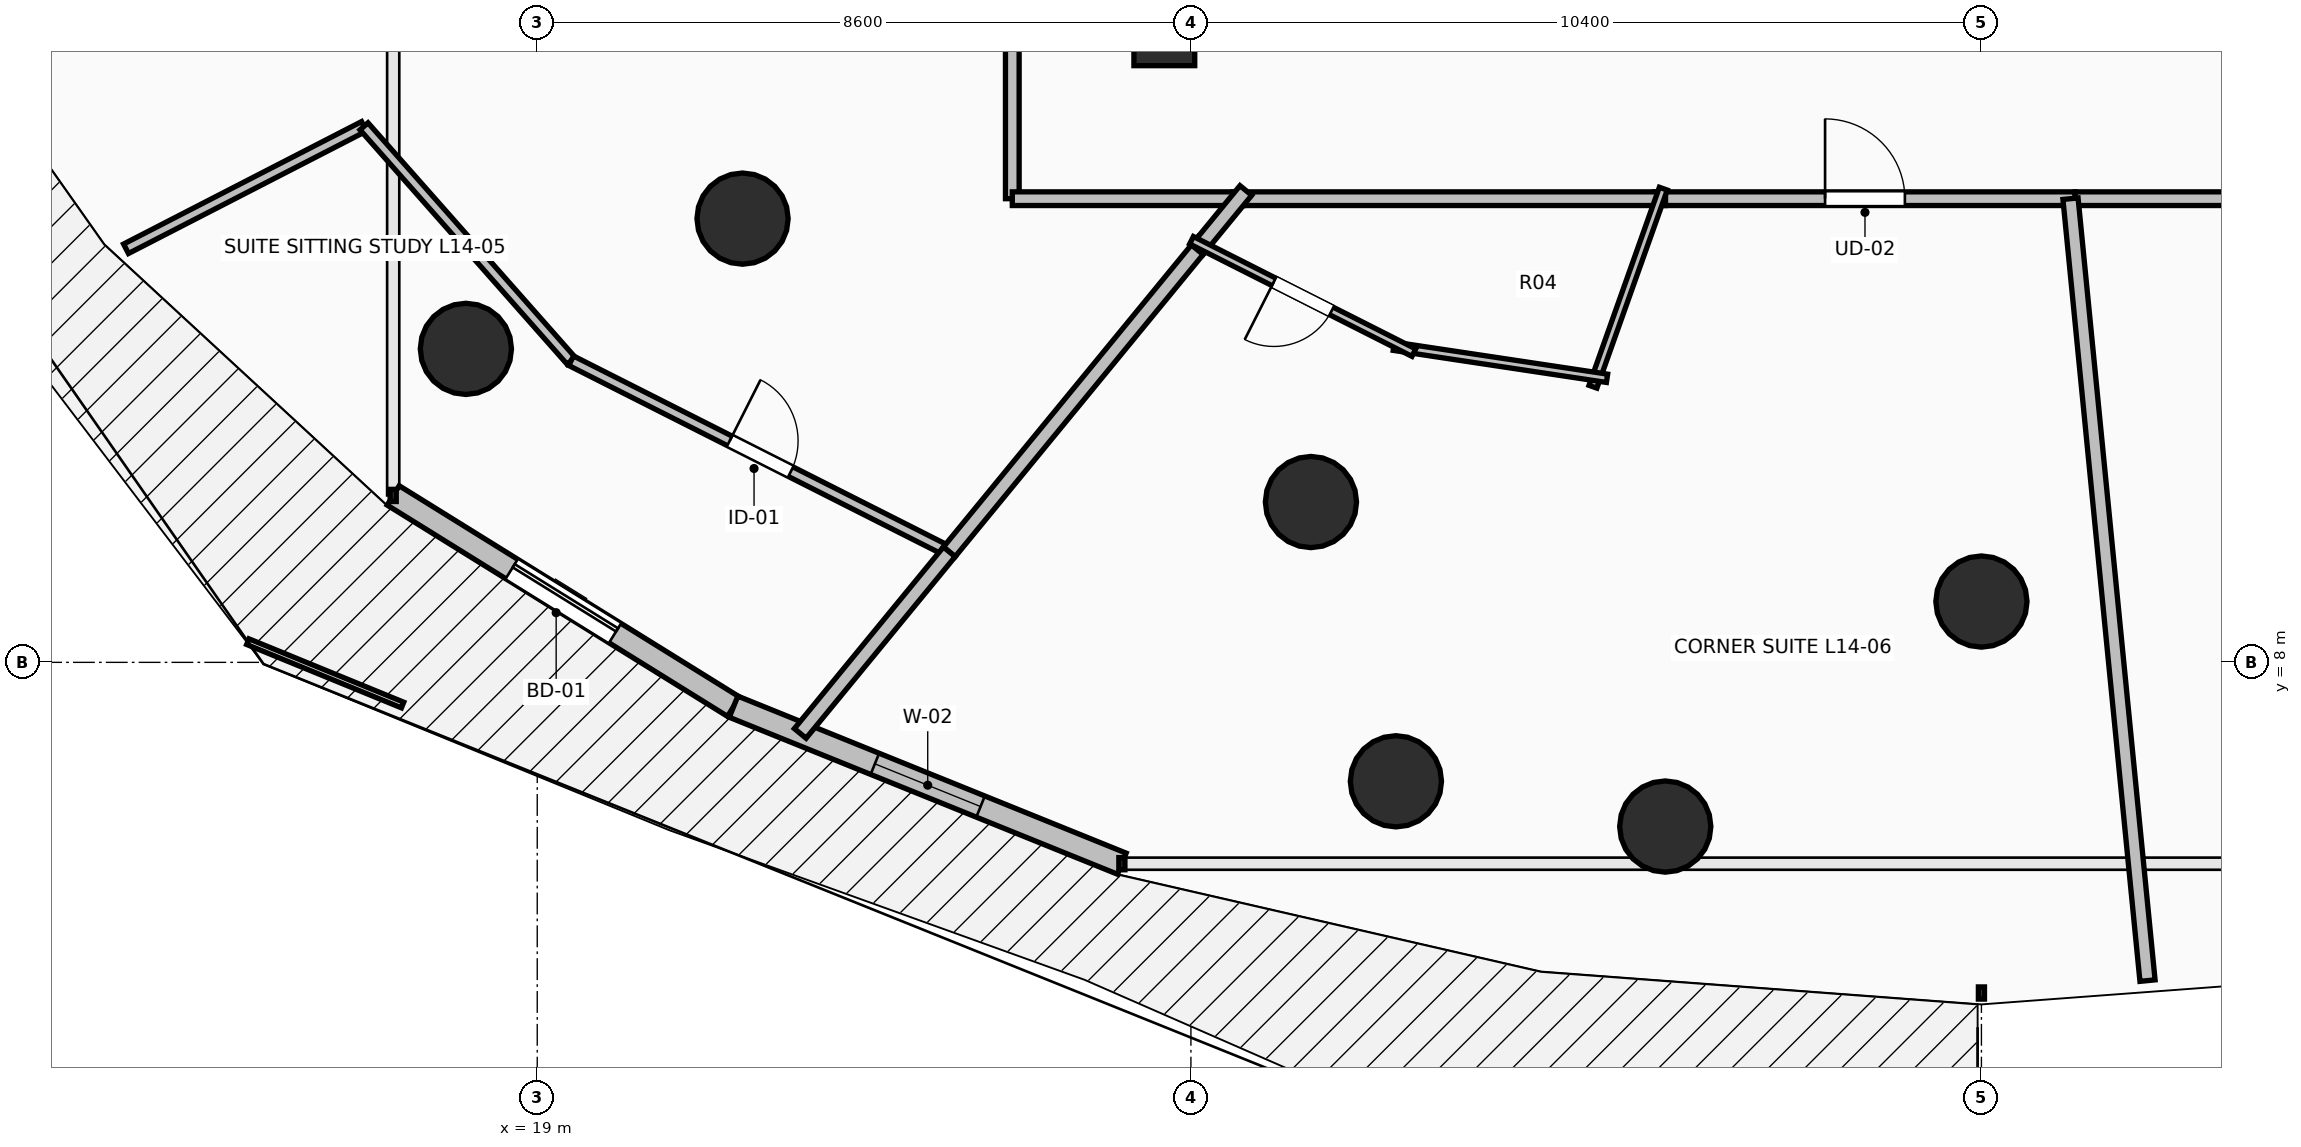
"""IFC4 building model, lengths in metres.
Left out: names, types, materials, properties, quantities, classifications, styles, units other than length and angle.
Written with IfcOpenShell. Run it as: python <this file> out.ifc"""

import sys

from ifc_helpers import new_model, si_unit, direction, frame, frame_2d, origin, origin_2d, place, context, subcontext, project, spatial, rectangle, circle, extrude, element, fill, save


model = new_model("IFC4")
c1 = context("Model", 3, precision=1e-05, world=origin(), true_north=direction((0.0, 1.0)))
c2 = subcontext(c1, "Body", "Model", "MODEL_VIEW")
j1 = project(units=[si_unit("LENGTHUNIT", "METRE"), si_unit("PLANEANGLEUNIT", "RADIAN")], contexts=[c1])
p1 = place(None, origin())
s1 = spatial("IfcSite", under=j1, at=p1, CompositionType="ELEMENT")
p2 = place(p1, origin())
s2 = spatial("IfcBuilding", under=s1, at=p2, CompositionType="ELEMENT")
p3 = place(p2, frame((0.0, 0.0, 55.5)))
s3 = spatial("IfcBuildingStorey", under=s2, at=p3, CompositionType="ELEMENT", Elevation=55.5)
for number, where, z_axis, x_axis in (
    (1, (21.701, 13.838, 0.0), (0.0, 0.0, 1.0), (-0.707, -0.707, 0.0)),
    (2, (29.179, 10.109, 0.0), (0.0, 0.0, 1.0), (-0.383, -0.924, 0.0)),
    (3, (38.0, 8.8, 0.0), (0.0, 0.0, 1.0), (0.0, -1.0, 0.0)),
    (4, (18.061, 12.124, 0.0), (0.0, 0.0, 1.0), (-0.707, -0.707, 0.0)),
    (5, (30.297, 6.435, 0.0), (0.0, 0.0, 1.0), (-0.383, -0.924, 0.0)),
    (6, (33.84, 5.84, 0.0), (0.0, 0.0, 1.0), (0.0, -1.0, 0.0)),
):
    element("IfcColumn", number, at=place(p3, frame(where, z_axis=z_axis, x_axis=x_axis)), inside=s3, PredefinedType="COLUMN", context=c2, shape_type="SweptSolid", body=[
        extrude(circle(Radius=0.6, at=origin_2d()), origin(), (0.0, 0.0, 1.0), 3.5),
    ])
p4 = place(p3, frame((27.25, 16.45, 0.0), z_axis=(0.0, 0.0, 1.0), x_axis=(1.0, 0.0, 0.0)))
e7 = element("IfcColumn", 7, at=p4, inside=s3, PredefinedType="PILASTER", context=c2, shape_type="SweptSolid", body=[
    extrude(rectangle(XDim=0.8, YDim=1.2, at=origin_2d()), origin(), (0.0, 0.0, 1.0), 3.5),
])
p5 = place(p3, frame((17.105, 10.196, 0.0), z_axis=(0.0, 0.0, 1.0), x_axis=(0.849633724826, -0.527373239404, 0.0)))
e8 = element("IfcWall", 8, at=p5, inside=s3, PredefinedType="STANDARD", context=c2, shape_type="SweptSolid", body=[
    extrude(rectangle(XDim=5.271, YDim=0.3, at=frame_2d((2.635, 0.0))), origin(), (0.0, 0.0, 1.0), 3.24),
])
p6 = place(p5, frame((1.835, 0.0, 0.0)))
e9 = element("IfcOpeningElement", 9, at=p6, cuts=e8, PredefinedType="OPENING", context=c2, shape_type="SweptSolid", body=[
    extrude(rectangle(XDim=1.6, YDim=2.3, at=frame_2d((0.8, 1.15))), frame((0.0, 0.165, 0.0), z_axis=(0.0, -1.0, 0.0), x_axis=(1.0, 0.0, 0.0)), (0.0, 0.0, 1.0), 0.33),
])
p7 = place(p3, frame((21.583, 7.417, 0.0), z_axis=(0.0, 0.0, 1.0), x_axis=(0.927095325176, -0.374825636845, 0.0)))
e10 = element("IfcWall", 10, at=p7, inside=s3, PredefinedType="STANDARD", context=c2, shape_type="SweptSolid", body=[
    extrude(rectangle(XDim=5.51, YDim=0.3, at=frame_2d((2.755, 0.0))), origin(), (0.0, 0.0, 1.0), 3.24),
])
p8 = place(p7, frame((2.005, 0.0, 0.85)))
e11 = element("IfcOpeningElement", 11, at=p8, cuts=e10, PredefinedType="OPENING", context=c2, shape_type="SweptSolid", body=[
    extrude(rectangle(XDim=1.5, YDim=2.19, at=frame_2d((0.75, 1.095))), frame((0.0, 0.165, 0.0), z_axis=(0.0, -1.0, 0.0), x_axis=(1.0, 0.0, 0.0)), (0.0, 0.0, 1.0), 0.33),
])
p9 = place(p3, frame((25.25, 19.999, 0.0), z_axis=(0.0, 0.0, 1.0), x_axis=(0.0, -1.0, 0.0)))
e12 = element("IfcWall", 12, at=p9, inside=s3, PredefinedType="PARTITIONING", context=c2, shape_type="SweptSolid", body=[
    extrude(rectangle(XDim=5.899, YDim=0.18, at=frame_2d((2.949, 0.0))), origin(), (0.0, 0.0, 1.0), 2.432),
])
p10 = place(p9, frame((2.425, 0.0, 0.0)))
e13 = element("IfcOpeningElement", 13, at=p10, cuts=e12, PredefinedType="OPENING", context=c2, shape_type="SweptSolid", body=[
    extrude(rectangle(XDim=1.05, YDim=2.2, at=frame_2d((0.525, 1.1))), frame((0.0, 0.105, 0.0), z_axis=(0.0, -1.0, 0.0), x_axis=(1.0, 0.0, 0.0)), (0.0, 0.0, 1.0), 0.21),
])
p11 = place(p3, frame((25.25, 14.1, 0.0), z_axis=(0.0, 0.0, 1.0), x_axis=(1.0, 0.0, 0.0)))
e14 = element("IfcWall", 14, at=p11, inside=s3, PredefinedType="PARTITIONING", context=c2, shape_type="SweptSolid", body=[
    extrude(rectangle(XDim=3.044, YDim=0.18, at=frame_2d((1.522, 0.0))), origin(), (0.0, 0.0, 1.0), 2.432),
])
p12 = place(p3, frame((33.704, 14.1, 0.0), z_axis=(0.0, 0.0, 1.0), x_axis=(1.0, 0.0, 0.0)))
e15 = element("IfcWall", 15, at=p12, inside=s3, PredefinedType="PARTITIONING", context=c2, shape_type="SweptSolid", body=[
    extrude(rectangle(XDim=5.528, YDim=0.18, at=frame_2d((2.764, 0.0))), origin(), (0.0, 0.0, 1.0), 3.24),
])
p13 = place(p12, frame((2.239, 0.0, 0.0)))
e16 = element("IfcOpeningElement", 16, at=p13, cuts=e15, PredefinedType="OPENING", context=c2, shape_type="SweptSolid", body=[
    extrude(rectangle(XDim=1.05, YDim=2.2, at=frame_2d((0.525, 1.1))), frame((0.0, 0.105, 0.0), z_axis=(0.0, -1.0, 0.0), x_axis=(1.0, 0.0, 0.0)), (0.0, 0.0, 1.0), 0.21),
])
p14 = place(p3, frame((28.154, 14.1, 0.0), z_axis=(0.0, 0.0, 1.0), x_axis=(1.0, 0.0, 0.0)))
e17 = element("IfcWall", 17, at=p14, inside=s3, PredefinedType="PARTITIONING", context=c2, shape_type="SweptSolid", body=[
    extrude(rectangle(XDim=5.69, YDim=0.18, at=frame_2d((2.845, 0.0))), origin(), (0.0, 0.0, 1.0), 2.432),
])
p15 = place(p3, frame((39.232, 14.1, 0.0), z_axis=(0.0, 0.0, 1.0), x_axis=(1.0, 0.0, 0.0)))
e18 = element("IfcWall", 18, at=p15, inside=s3, PredefinedType="PARTITIONING", context=c2, shape_type="SweptSolid", body=[
    extrude(rectangle(XDim=2.968, YDim=0.18, at=frame_2d((1.484, 0.0))), origin(), (0.0, 0.0, 1.0), 3.24),
])
p16 = place(p3, frame((13.59, 13.441, 0.0), z_axis=(0.0, 0.0, 1.0), x_axis=(0.889180616302, 0.457556369852, 0.0)))
e19 = element("IfcWall", 19, at=p16, inside=s3, PredefinedType="PARTITIONING", context=c2, shape_type="SweptSolid", body=[
    extrude(rectangle(XDim=3.521, YDim=0.14, at=frame_2d((1.76, 0.0))), origin(), (0.0, 0.0, 1.0), 2.624),
])
p17 = place(p3, frame((16.721, 15.052, 0.0), z_axis=(0.0, 0.0, 1.0), x_axis=(0.662159063844, -0.749363312532, 0.0)))
e20 = element("IfcWall", 20, at=p17, inside=s3, PredefinedType="PARTITIONING", context=c2, shape_type="SweptSolid", body=[
    extrude(rectangle(XDim=4.115, YDim=0.14, at=frame_2d((2.058, 0.0))), origin(), (0.0, 0.0, 1.0), 2.432),
])
p18 = place(p3, frame((19.446, 11.968, 0.0), z_axis=(0.0, 0.0, 1.0), x_axis=(0.892518178955, -0.451011419184, 0.0)))
e21 = element("IfcWall", 21, at=p18, inside=s3, PredefinedType="PARTITIONING", context=c2, shape_type="SweptSolid", body=[
    extrude(rectangle(XDim=5.574, YDim=0.14, at=frame_2d((2.787, 0.0))), origin(), (0.0, 0.0, 1.0), 3.24),
])
p19 = place(p18, frame((2.337, 0.0, 0.0)))
e22 = element("IfcOpeningElement", 22, at=p19, cuts=e21, PredefinedType="OPENING", context=c2, shape_type="SweptSolid", body=[
    extrude(rectangle(XDim=0.9, YDim=2.1, at=frame_2d((0.45, 1.05))), frame((0.0, 0.085, 0.0), z_axis=(0.0, -1.0, 0.0), x_axis=(1.0, 0.0, 0.0)), (0.0, 0.0, 1.0), 0.17),
])
p20 = place(p3, frame((24.421, 9.454, 0.0), z_axis=(0.0, 0.0, 1.0), x_axis=(0.634420016008, 0.772988514332, 0.0)))
e23 = element("IfcWall", 23, at=p20, inside=s3, PredefinedType="PARTITIONING", context=c2, shape_type="SweptSolid", body=[
    extrude(rectangle(XDim=5.282, YDim=0.2, at=frame_2d((2.641, 0.0))), origin(), (0.0, 0.0, 1.0), 2.886),
])
p21 = place(p3, frame((27.683, 13.429, 0.0), z_axis=(0.0, 0.0, 1.0), x_axis=(0.634186727441, 0.77317992391, 0.0)))
e24 = element("IfcWall", 24, at=p21, inside=s3, PredefinedType="PARTITIONING", context=c2, shape_type="SweptSolid", body=[
    extrude(rectangle(XDim=1.008, YDim=0.2, at=frame_2d((0.504, 0.0))), origin(), (0.0, 0.0, 1.0), 2.432),
])
p22 = place(p3, frame((22.46, 7.065, 0.0), z_axis=(0.0, 0.0, 1.0), x_axis=(0.634432805544, 0.772978017313, 0.0)))
e25 = element("IfcWall", 25, at=p22, inside=s3, PredefinedType="PARTITIONING", context=c2, shape_type="SweptSolid", body=[
    extrude(rectangle(XDim=3.091, YDim=0.2, at=frame_2d((1.545, 0.0))), origin(), (0.0, 0.0, 1.0), 2.624),
])
p23 = place(p3, frame((33.815, 14.232, 0.0), z_axis=(0.0, 0.0, 1.0), x_axis=(-0.334786713612, -0.942293933117, 0.0)))
e26 = element("IfcWall", 26, at=p23, inside=s3, PredefinedType="PARTITIONING", context=c2, shape_type="SweptSolid", body=[
    extrude(rectangle(XDim=2.765, YDim=0.11, at=frame_2d((1.383, 0.0))), origin(), (0.0, 0.0, 1.0), 2.929),
])
p24 = place(p3, frame((33.074, 11.737, 0.0), z_axis=(0.0, 0.0, 1.0), x_axis=(-0.988902866222, 0.148563525729, 0.0)))
e27 = element("IfcWall", 27, at=p24, inside=s3, PredefinedType="PARTITIONING", context=c2, shape_type="SweptSolid", body=[
    extrude(rectangle(XDim=2.836, YDim=0.11, at=frame_2d((1.418, 0.0))), origin(), (0.0, 0.0, 1.0), 3.24),
])
p25 = place(p3, frame((30.533, 12.075, 0.0), z_axis=(0.0, 0.0, 1.0), x_axis=(-0.892451870397, 0.451142614952, 0.0)))
e28 = element("IfcWall", 28, at=p25, inside=s3, PredefinedType="PARTITIONING", context=c2, shape_type="SweptSolid", body=[
    extrude(rectangle(XDim=3.277, YDim=0.11, at=frame_2d((1.639, 0.0))), origin(), (0.0, 0.0, 1.0), 2.432),
])
p26 = place(p25, frame((1.214, 0.0, 0.0)))
e29 = element("IfcOpeningElement", 29, at=p26, cuts=e28, PredefinedType="OPENING", context=c2, shape_type="SweptSolid", body=[
    extrude(rectangle(XDim=0.85, YDim=2.1, at=frame_2d((0.425, 1.05))), frame((0.0, 0.07, 0.0), z_axis=(0.0, -1.0, 0.0), x_axis=(1.0, 0.0, 0.0)), (0.0, 0.0, 1.0), 0.14),
])
p27 = place(p3, frame((40.185, 3.813, 0.0), z_axis=(0.0, 0.0, 1.0), x_axis=(-0.097992958783, 0.99518710805, 0.0)))
e30 = element("IfcWall", 30, at=p27, inside=s3, PredefinedType="PARTITIONING", context=c2, shape_type="SweptSolid", body=[
    extrude(rectangle(XDim=10.337, YDim=0.2, at=frame_2d((5.168, 0.0))), origin(), (0.0, 0.0, 1.0), 2.432),
])
p28 = place(p6, origin())
e31 = element("IfcDoor", 31, at=p28, inside=s3, OperationType="SLIDING_TO_LEFT", PredefinedType="DOOR", context=c2, shape_type="SweptSolid", body=[
    extrude(rectangle(XDim=1.6, YDim=2.3, at=frame_2d((0.8, 1.15))), frame((0.0, 0.025, 0.0), z_axis=(0.0, -1.0, 0.0), x_axis=(1.0, 0.0, 0.0)), (0.0, 0.0, 1.0), 0.05),
])
fill(e9, e31)
p29 = place(p8, origin())
e32 = element("IfcWindow", 32, at=p29, inside=s3, PartitioningType="SINGLE_PANEL", PredefinedType="WINDOW", context=c2, shape_type="SweptSolid", body=[
    extrude(rectangle(XDim=1.5, YDim=2.19, at=frame_2d((0.75, 1.095))), frame((0.0, 0.03, 0.0), z_axis=(0.0, -1.0, 0.0), x_axis=(1.0, 0.0, 0.0)), (0.0, 0.0, 1.0), 0.06),
])
fill(e11, e32)
p30 = place(p13, origin())
e33 = element("IfcDoor", 33, at=p30, inside=s3, OperationType="SINGLE_SWING_LEFT", PredefinedType="DOOR", context=c2, shape_type="SweptSolid", body=[
    extrude(rectangle(XDim=1.05, YDim=2.2, at=frame_2d((0.525, 1.1))), frame((0.0, 0.025, 0.0), z_axis=(0.0, -1.0, 0.0), x_axis=(1.0, 0.0, 0.0)), (0.0, 0.0, 1.0), 0.05),
])
fill(e16, e33)
p31 = place(p19, origin())
e34 = element("IfcDoor", 34, at=p31, inside=s3, OperationType="SINGLE_SWING_LEFT", PredefinedType="DOOR", context=c2, shape_type="SweptSolid", body=[
    extrude(rectangle(XDim=0.9, YDim=2.1, at=frame_2d((0.45, 1.05))), frame((0.0, 0.025, 0.0), z_axis=(0.0, -1.0, 0.0), x_axis=(1.0, 0.0, 0.0)), (0.0, 0.0, 1.0), 0.05),
])
fill(e22, e34)
p32 = place(p26, origin())
e35 = element("IfcDoor", 35, at=p32, inside=s3, OperationType="SINGLE_SWING_RIGHT", PredefinedType="DOOR", context=c2, shape_type="SweptSolid", body=[
    extrude(rectangle(XDim=0.85, YDim=2.1, at=frame_2d((0.425, 1.05))), frame((0.0, 0.025, 0.0), z_axis=(0.0, -1.0, 0.0), x_axis=(1.0, 0.0, 0.0)), (0.0, 0.0, 1.0), 0.05),
])
fill(e29, e35)
save(model, sys.argv[1])
